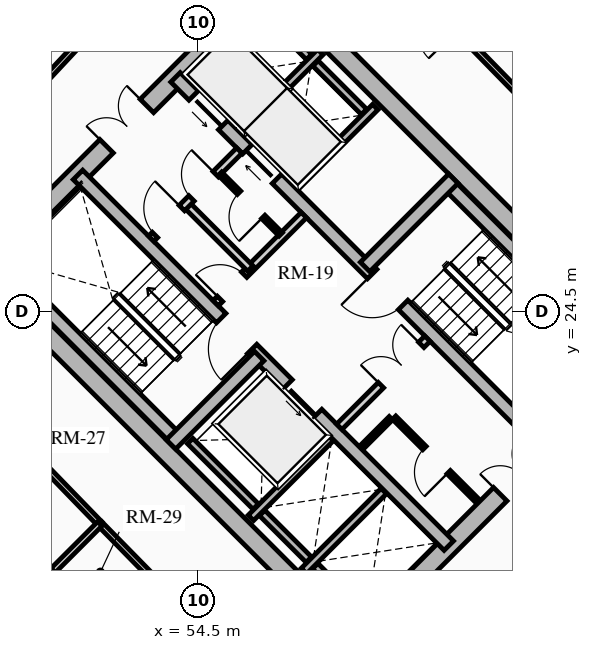
"""IFC4 building model, lengths in metres.
Left out: names, types, materials, properties, quantities, classifications, styles, units other than length and angle.
Written with IfcOpenShell. Run it as: python <this file> out.ifc"""

import sys

from ifc_helpers import new_model, si_unit, direction, frame, frame_2d, origin, place, context, subcontext, project, spatial, rectangle, extrude, source, transform, mapped, element, fill, save


model = new_model("IFC4")
c1 = context("Model", 3, precision=1e-05, world=origin(), true_north=direction((0.0, 1.0)))
c2 = subcontext(c1, "Body", "Model", "MODEL_VIEW")
j1 = project(units=[si_unit("LENGTHUNIT", "METRE"), si_unit("PLANEANGLEUNIT", "RADIAN")], contexts=[c1])
p1 = place(None, origin())
s1 = spatial("IfcSite", under=j1, at=p1, CompositionType="ELEMENT")
p2 = place(p1, origin())
s2 = spatial("IfcBuilding", under=s1, at=p2, CompositionType="ELEMENT")
p3 = place(p2, frame((0.0, 0.0, 27.82)))
s3 = spatial("IfcBuildingStorey", under=s2, at=p3, CompositionType="ELEMENT", Elevation=27.82)
for number, where, z_axis, x_axis in (
    (1, (58.773, 15.661, 0.0), (0.0, 0.0, 1.0), (-0.707, 0.707, 0.0)),
    (2, (66.339, 23.227, 0.0), (0.0, 0.0, 1.0), (-0.707, 0.707, 0.0)),
):
    element("IfcWall", number, at=place(p3, frame(where, z_axis=z_axis, x_axis=x_axis)), inside=s3, PredefinedType="SHEAR", context=c2, shape_type="SweptSolid", body=[
        extrude(rectangle(XDim=14.3, YDim=0.5, at=frame_2d((7.15, 0.0))), origin(), (0.0, 0.0, 1.0), 2.91),
    ])
p4 = place(p3, frame((58.596, 15.838, 0.0), z_axis=(0.0, 0.0, 1.0), x_axis=(0.707106781187, 0.707106781187, 0.0)))
e3 = element("IfcWall", 3, at=p4, inside=s3, PredefinedType="SHEAR", context=c2, shape_type="SweptSolid", body=[
    extrude(rectangle(XDim=10.7, YDim=0.5, at=frame_2d((5.35, 0.0))), origin(), (0.0, 0.0, 1.0), 2.91),
])
m1 = source(origin(), c2, "Body", "SweptSolid", [
    extrude(rectangle(XDim=1.5, YDim=2.02, at=frame_2d((0.75, 1.01))), frame((0.0, 0.26, 0.0), z_axis=(0.0, -1.0, 0.0), x_axis=(1.0, 0.0, 0.0)), (0.0, 0.0, 1.0), 0.52),
])
p5 = place(p4, frame((5.45, 0.0, 0.0)))
e4 = element("IfcOpeningElement", 4, at=p5, cuts=e3, PredefinedType="OPENING", context=c2, shape_type="MappedRepresentation", body=[
    mapped(m1, transform((0.0, 0.0, 0.0), x_axis=(1.0, 0.0, 0.0), y_axis=(0.0, 1.0, 0.0), z_axis=(0.0, 0.0, 1.0), scale=1.0)),
])
p6 = place(p3, frame((48.838, 25.596, 0.0), z_axis=(0.0, 0.0, 1.0), x_axis=(0.707106781187, 0.707106781187, 0.0)))
e5 = element("IfcWall", 5, at=p6, inside=s3, PredefinedType="SHEAR", context=c2, shape_type="SweptSolid", body=[
    extrude(rectangle(XDim=10.7, YDim=0.5, at=frame_2d((5.35, 0.0))), origin(), (0.0, 0.0, 1.0), 2.91),
])
p7 = place(p6, frame((4.6, 0.0, 0.0)))
e6 = element("IfcOpeningElement", 6, at=p7, cuts=e5, PredefinedType="OPENING", context=c2, shape_type="MappedRepresentation", body=[
    mapped(m1, transform((0.0, 0.0, 0.0), x_axis=(1.0, 0.0, 0.0), y_axis=(0.0, 1.0, 0.0), z_axis=(0.0, 0.0, 1.0), scale=1.0)),
])
p8 = place(p3, frame((61.096, 18.338, 0.0), z_axis=(0.0, 0.0, 1.0), x_axis=(-0.707106781187, 0.707106781187, 0.0)))
e7 = element("IfcWall", 7, at=p8, inside=s3, PredefinedType="SHEAR", context=c2, shape_type="SweptSolid", body=[
    extrude(rectangle(XDim=13.8, YDim=0.35, at=frame_2d((6.9, 0.0))), origin(), (0.0, 0.0, 1.0), 2.91),
])
m2 = source(origin(), c2, "Body", "SweptSolid", [
    extrude(rectangle(XDim=1.1, YDim=2.015, at=frame_2d((0.55, 1.007))), frame((0.0, 0.185, 0.0), z_axis=(0.0, -1.0, 0.0), x_axis=(1.0, 0.0, 0.0)), (0.0, 0.0, 1.0), 0.37),
])
p9 = place(p8, frame((4.9, 0.0, 0.0)))
e8 = element("IfcOpeningElement", 8, at=p9, cuts=e7, PredefinedType="OPENING", context=c2, shape_type="MappedRepresentation", body=[
    mapped(m2, transform((0.0, 0.0, 0.0), x_axis=(1.0, 0.0, 0.0), y_axis=(0.0, 1.0, 0.0), z_axis=(0.0, 0.0, 1.0), scale=1.0)),
])
m3 = source(origin(), c2, "Body", "SweptSolid", [
    extrude(rectangle(XDim=1.15, YDim=2.02, at=frame_2d((0.575, 1.01))), frame((0.0, 0.185, 0.0), z_axis=(0.0, -1.0, 0.0), x_axis=(1.0, 0.0, 0.0)), (0.0, 0.0, 1.0), 0.37),
])
p10 = place(p8, frame((7.32, 0.0, 0.0)))
e9 = element("IfcOpeningElement", 9, at=p10, cuts=e7, PredefinedType="OPENING", context=c2, shape_type="MappedRepresentation", body=[
    mapped(m3, transform((0.0, 0.0, 0.0), x_axis=(1.0, 0.0, 0.0), y_axis=(0.0, 1.0, 0.0), z_axis=(0.0, 0.0, 1.0), scale=1.0)),
])
p11 = place(p3, frame((63.662, 20.904, 0.0), z_axis=(0.0, 0.0, 1.0), x_axis=(-0.707106781187, 0.707106781187, 0.0)))
e10 = element("IfcWall", 10, at=p11, inside=s3, PredefinedType="SHEAR", context=c2, shape_type="SweptSolid", body=[
    extrude(rectangle(XDim=13.8, YDim=0.35, at=frame_2d((6.9, 0.0))), origin(), (0.0, 0.0, 1.0), 2.91),
])
p12 = place(p11, frame((10.025, 0.0, 0.0)))
e11 = element("IfcOpeningElement", 11, at=p12, cuts=e10, PredefinedType="OPENING", context=c2, shape_type="MappedRepresentation", body=[
    mapped(m2, transform((0.0, 0.0, 0.0), x_axis=(1.0, 0.0, 0.0), y_axis=(0.0, 1.0, 0.0), z_axis=(0.0, 0.0, 1.0), scale=1.0)),
])
p13 = place(p11, frame((12.025, 0.0, 0.0)))
e12 = element("IfcOpeningElement", 12, at=p13, cuts=e10, PredefinedType="OPENING", context=c2, shape_type="MappedRepresentation", body=[
    mapped(m2, transform((0.0, 0.0, 0.0), x_axis=(1.0, 0.0, 0.0), y_axis=(0.0, 1.0, 0.0), z_axis=(0.0, 0.0, 1.0), scale=1.0)),
])
p14 = place(p11, frame((5.33, 0.0, 0.0)))
e13 = element("IfcOpeningElement", 13, at=p14, cuts=e10, PredefinedType="OPENING", context=c2, shape_type="MappedRepresentation", body=[
    mapped(m3, transform((0.0, 0.0, 0.0), x_axis=(1.0, 0.0, 0.0), y_axis=(0.0, 1.0, 0.0), z_axis=(0.0, 0.0, 1.0), scale=1.0)),
])
p15 = place(p3, frame((53.922, 21.141, 0.0), z_axis=(0.0, 0.0, 1.0), x_axis=(-0.707106781187, 0.707106781187, 0.0)))
e14 = element("IfcWall", 14, at=p15, inside=s3, PredefinedType="SHEAR", context=c2, shape_type="SweptSolid", body=[
    extrude(rectangle(XDim=6.745, YDim=0.35, at=frame_2d((3.373, 0.0))), origin(), (0.0, 0.0, 1.0), 2.91),
])
p16 = place(p3, frame((53.784, 21.003, 0.0), z_axis=(0.0, 0.0, 1.0), x_axis=(0.707106781187, 0.707106781187, 0.0)))
e15 = element("IfcWall", 15, at=p16, inside=s3, PredefinedType="SHEAR", context=c2, shape_type="SweptSolid", body=[
    extrude(rectangle(XDim=3.285, YDim=0.35, at=frame_2d((1.643, 0.0))), origin(), (0.0, 0.0, 1.0), 2.91),
])
p17 = place(p3, frame((65.847, 23.089, 0.0), z_axis=(0.0, 0.0, 1.0), x_axis=(-0.707106781187, 0.707106781187, 0.0)))
e16 = element("IfcWall", 16, at=p17, inside=s3, PredefinedType="SHEAR", context=c2, shape_type="SweptSolid", body=[
    extrude(rectangle(XDim=6.745, YDim=0.35, at=frame_2d((3.373, 0.0))), origin(), (0.0, 0.0, 1.0), 2.91),
])
p18 = place(p3, frame((58.893, 25.674, 0.0), z_axis=(0.0, 0.0, 1.0), x_axis=(0.707106781187, 0.707106781187, 0.0)))
e17 = element("IfcWall", 17, at=p18, inside=s3, PredefinedType="SHEAR", context=c2, shape_type="SweptSolid", body=[
    extrude(rectangle(XDim=3.285, YDim=0.35, at=frame_2d((1.643, 0.0))), origin(), (0.0, 0.0, 1.0), 2.91),
])
p19 = place(p3, frame((55.888, 19.069, 0.0), z_axis=(0.0, 0.0, 1.0), x_axis=(0.707106781187, 0.707106781187, 0.0)))
e18 = element("IfcWall", 18, at=p19, inside=s3, PredefinedType="SHEAR", context=c2, shape_type="SweptSolid", body=[
    extrude(rectangle(XDim=2.97, YDim=0.2, at=frame_2d((1.485, 0.0))), origin(), (0.0, 0.0, 1.0), 2.91),
])
p20 = place(p3, frame((56.015, 19.366, 0.0), z_axis=(0.0, 0.0, 1.0), x_axis=(-0.707106781187, 0.707106781187, 0.0)))
e19 = element("IfcWall", 19, at=p20, inside=s3, PredefinedType="SHEAR", context=c2, shape_type="SweptSolid", body=[
    extrude(rectangle(XDim=2.44, YDim=0.2, at=frame_2d((1.22, 0.0))), origin(), (0.0, 0.0, 1.0), 2.91),
])
p21 = place(p3, frame((57.284, 17.673, 0.0), z_axis=(0.0, 0.0, 1.0), x_axis=(0.707147878904, 0.70706568108, 0.0)))
e20 = element("IfcWall", 20, at=p21, inside=s3, PredefinedType="SHEAR", context=c2, shape_type="SweptSolid", body=[
    extrude(rectangle(XDim=2.97, YDim=0.2, at=frame_2d((1.485, 0.0))), origin(), (0.0, 0.0, 1.0), 2.91),
])
p22 = place(p3, frame((57.412, 17.97, 0.0), z_axis=(0.0, 0.0, 1.0), x_axis=(-0.707106781187, 0.707106781187, 0.0)))
e21 = element("IfcWall", 21, at=p22, inside=s3, PredefinedType="SHEAR", context=c2, shape_type="SweptSolid", body=[
    extrude(rectangle(XDim=1.735, YDim=0.2, at=frame_2d((0.867, 0.0))), origin(), (0.0, 0.0, 1.0), 2.91),
])
p23 = place(p3, frame((58.737, 16.644, 0.0), z_axis=(0.0, 0.0, 1.0), x_axis=(-0.707032117043, 0.707181437447, 0.0)))
e22 = element("IfcWall", 22, at=p23, inside=s3, PredefinedType="SHEAR", context=c2, shape_type="SweptSolid", body=[
    extrude(rectangle(XDim=1.635, YDim=0.2, at=frame_2d((0.817, 0.0))), origin(), (0.0, 0.0, 1.0), 2.91),
])
p24 = place(p3, frame((57.062, 27.781, 0.0), z_axis=(0.0, 0.0, 1.0), x_axis=(0.707106781187, 0.707106781187, 0.0)))
e23 = element("IfcWall", 23, at=p24, inside=s3, PredefinedType="SHEAR", context=c2, shape_type="SweptSolid", body=[
    extrude(rectangle(XDim=2.97, YDim=0.2, at=frame_2d((1.485, 0.0))), origin(), (0.0, 0.0, 1.0), 2.91),
])
p25 = place(p3, frame((55.615, 29.227, 0.0), z_axis=(0.0, 0.0, 1.0), x_axis=(0.707147878904, 0.70706568108, 0.0)))
e24 = element("IfcWall", 24, at=p25, inside=s3, PredefinedType="SHEAR", context=c2, shape_type="SweptSolid", body=[
    extrude(rectangle(XDim=2.97, YDim=0.2, at=frame_2d((1.485, 0.0))), origin(), (0.0, 0.0, 1.0), 2.91),
])
p26 = place(p3, frame((58.865, 29.754, 0.0), z_axis=(0.0, 0.0, 1.0), x_axis=(-0.707174411312, 0.707039144592, 0.0)))
e25 = element("IfcWall", 25, at=p26, inside=s3, PredefinedType="SHEAR", context=c2, shape_type="SweptSolid", body=[
    extrude(rectangle(XDim=1.805, YDim=0.2, at=frame_2d((0.902, 0.0))), origin(), (0.0, 0.0, 1.0), 2.91),
])
p27 = place(p3, frame((57.419, 31.2, 0.0), z_axis=(0.0, 0.0, 1.0), x_axis=(-0.707032117043, 0.707181437447, 0.0)))
e26 = element("IfcWall", 26, at=p27, inside=s3, PredefinedType="SHEAR", context=c2, shape_type="SweptSolid", body=[
    extrude(rectangle(XDim=1.635, YDim=0.2, at=frame_2d((0.817, 0.0))), origin(), (0.0, 0.0, 1.0), 2.91),
])
p28 = place(p3, frame((58.214, 21.467, 0.0), z_axis=(0.0, 0.0, 1.0), x_axis=(0.707106781187, 0.707106781187, 0.0)))
e27 = element("IfcWall", 27, at=p28, inside=s3, PredefinedType="PARTITIONING", context=c2, shape_type="SweptSolid", body=[
    extrude(rectangle(XDim=3.28, YDim=0.2, at=frame_2d((1.64, 0.0))), origin(), (0.0, 0.0, 1.0), 2.635),
])
m4 = source(origin(), c2, "Body", "SweptSolid", [
    extrude(rectangle(XDim=1.5, YDim=2.02, at=frame_2d((0.75, 1.01))), frame((0.0, 0.11, 0.0), z_axis=(0.0, -1.0, 0.0), x_axis=(1.0, 0.0, 0.0)), (0.0, 0.0, 1.0), 0.22),
])
p29 = place(p28, frame((1.55, 0.0, 0.0)))
e28 = element("IfcOpeningElement", 28, at=p29, cuts=e27, PredefinedType="OPENING", context=c2, shape_type="MappedRepresentation", body=[
    mapped(m4, transform((0.0, 0.0, 0.0), x_axis=(1.0, 0.0, 0.0), y_axis=(0.0, 1.0, 0.0), z_axis=(0.0, 0.0, 1.0), scale=1.0)),
])
p30 = place(p3, frame((54.961, 24.719, 0.0), z_axis=(0.0, 0.0, 1.0), x_axis=(0.707106781187, 0.707106781187, 0.0)))
e29 = element("IfcWall", 29, at=p30, inside=s3, PredefinedType="PARTITIONING", context=c2, shape_type="SweptSolid", body=[
    extrude(rectangle(XDim=3.28, YDim=0.2, at=frame_2d((1.64, 0.0))), origin(), (0.0, 0.0, 1.0), 2.635),
])
m5 = source(origin(), c2, "Body", "SweptSolid", [
    extrude(rectangle(XDim=0.9, YDim=2.005, at=frame_2d((0.45, 1.002))), frame((0.0, 0.11, 0.0), z_axis=(0.0, -1.0, 0.0), x_axis=(1.0, 0.0, 0.0)), (0.0, 0.0, 1.0), 0.22),
])
p31 = place(p30, frame((0.16, 0.0, 0.0)))
e30 = element("IfcOpeningElement", 30, at=p31, cuts=e29, PredefinedType="OPENING", context=c2, shape_type="MappedRepresentation", body=[
    mapped(m5, transform((0.0, 0.0, 0.0), x_axis=(1.0, 0.0, 0.0), y_axis=(0.0, 1.0, 0.0), z_axis=(0.0, 0.0, 1.0), scale=1.0)),
])
p32 = place(p3, frame((55.874, 25.631, 0.0), z_axis=(0.0, 0.0, 1.0), x_axis=(-0.707157639372, 0.707055919343, 0.0)))
e31 = element("IfcWall", 31, at=p32, inside=s3, PredefinedType="PARTITIONING", context=c2, shape_type="SweptSolid", body=[
    extrude(rectangle(XDim=2.4, YDim=0.2, at=frame_2d((1.2, 0.0))), origin(), (0.0, 0.0, 1.0), 2.635),
])
p33 = place(p3, frame((53.264, 26.416, 0.0), z_axis=(0.0, 0.0, 1.0), x_axis=(0.707106781187, 0.707106781187, 0.0)))
e32 = element("IfcWall", 32, at=p33, inside=s3, PredefinedType="PARTITIONING", context=c2, shape_type="SweptSolid", body=[
    extrude(rectangle(XDim=3.28, YDim=0.2, at=frame_2d((1.64, 0.0))), origin(), (0.0, 0.0, 1.0), 2.635),
])
m6 = source(origin(), c2, "Body", "SweptSolid", [
    extrude(rectangle(XDim=1.0, YDim=2.015, at=frame_2d((0.5, 1.007))), frame((0.0, 0.11, 0.0), z_axis=(0.0, -1.0, 0.0), x_axis=(1.0, 0.0, 0.0)), (0.0, 0.0, 1.0), 0.22),
])
p34 = place(p33, frame((0.14, 0.0, 0.0)))
e33 = element("IfcOpeningElement", 33, at=p34, cuts=e32, PredefinedType="OPENING", context=c2, shape_type="MappedRepresentation", body=[
    mapped(m6, transform((0.0, 0.0, 0.0), x_axis=(1.0, 0.0, 0.0), y_axis=(0.0, 1.0, 0.0), z_axis=(0.0, 0.0, 1.0), scale=1.0)),
])
p35 = place(p33, frame((1.5, 0.0, 0.0)))
e34 = element("IfcOpeningElement", 34, at=p35, cuts=e32, PredefinedType="OPENING", context=c2, shape_type="MappedRepresentation", body=[
    mapped(m5, transform((0.0, 0.0, 0.0), x_axis=(1.0, 0.0, 0.0), y_axis=(0.0, 1.0, 0.0), z_axis=(0.0, 0.0, 1.0), scale=1.0)),
])
p36 = place(p3, frame((61.835, 19.529, 0.0), z_axis=(0.0, 0.0, 1.0), x_axis=(-0.707146413884, 0.707067146267, 0.0)))
e35 = element("IfcWall", 35, at=p36, inside=s3, PredefinedType="PARTITIONING", context=c2, shape_type="SweptSolid", body=[
    extrude(rectangle(XDim=3.08, YDim=0.125, at=frame_2d((1.54, 0.0))), origin(), (0.0, 0.0, 1.0), 2.635),
])
m7 = source(origin(), c2, "Body", "SweptSolid", [
    extrude(rectangle(XDim=0.9, YDim=2.005, at=frame_2d((0.45, 1.002))), frame((0.0, 0.073, 0.0), z_axis=(0.0, -1.0, 0.0), x_axis=(1.0, 0.0, 0.0)), (0.0, 0.0, 1.0), 0.145),
])
p37 = place(p36, frame((1.05, 0.0, 0.0)))
e36 = element("IfcOpeningElement", 36, at=p37, cuts=e35, PredefinedType="OPENING", context=c2, shape_type="MappedRepresentation", body=[
    mapped(m7, transform((0.0, 0.0, 0.0), x_axis=(1.0, 0.0, 0.0), y_axis=(0.0, 1.0, 0.0), z_axis=(0.0, 0.0, 1.0), scale=1.0)),
])
p38 = place(p3, frame((58.794, 20.915, 0.0), z_axis=(0.0, 0.0, 1.0), x_axis=(0.707106781187, 0.707106781187, 0.0)))
e37 = element("IfcWall", 37, at=p38, inside=s3, PredefinedType="PARTITIONING", context=c2, shape_type="SweptSolid", body=[
    extrude(rectangle(XDim=1.1, YDim=0.125, at=frame_2d((0.55, 0.0))), origin(), (0.0, 0.0, 1.0), 2.635),
])
p39 = place(p3, frame((56.673, 26.529, 0.0), z_axis=(0.0, 0.0, 1.0), x_axis=(-0.707052764397, 0.70716079385, 0.0)))
e38 = element("IfcWall", 38, at=p39, inside=s3, PredefinedType="PARTITIONING", context=c2, shape_type="SweptSolid", body=[
    extrude(rectangle(XDim=2.26, YDim=0.125, at=frame_2d((1.13, 0.0))), origin(), (0.0, 0.0, 1.0), 2.635),
])
p40 = place(p39, frame((0.65, 0.0, 0.0)))
e39 = element("IfcOpeningElement", 39, at=p40, cuts=e38, PredefinedType="OPENING", context=c2, shape_type="MappedRepresentation", body=[
    mapped(m7, transform((0.0, 0.0, 0.0), x_axis=(1.0, 0.0, 0.0), y_axis=(0.0, 1.0, 0.0), z_axis=(0.0, 0.0, 1.0), scale=1.0)),
])
p41 = place(p3, frame((63.086, 30.086, 0.0), z_axis=(0.0, 0.0, 1.0), x_axis=(-0.699075897379, 0.715047473741, 0.0)))
e40 = element("IfcWall", 40, at=p41, inside=s3, PredefinedType="PARTITIONING", context=c2, shape_type="SweptSolid", body=[
    extrude(rectangle(XDim=6.114, YDim=0.15, at=frame_2d((3.057, 0.0))), origin(), (0.0, 0.0, 1.0), 2.159),
])
m8 = source(origin(), c2, "Body", "SweptSolid", [
    extrude(rectangle(XDim=1.05, YDim=2.015, at=frame_2d((0.525, 1.007))), frame((0.0, 0.085, 0.0), z_axis=(0.0, -1.0, 0.0), x_axis=(1.0, 0.0, 0.0)), (0.0, 0.0, 1.0), 0.17),
])
p42 = place(p41, frame((2.532, 0.0, 0.0)))
e41 = element("IfcOpeningElement", 41, at=p42, cuts=e40, PredefinedType="OPENING", context=c2, shape_type="MappedRepresentation", body=[
    mapped(m8, transform((0.0, 0.0, 0.0), x_axis=(1.0, 0.0, 0.0), y_axis=(0.0, 1.0, 0.0), z_axis=(0.0, 0.0, 1.0), scale=1.0)),
])
p43 = place(p3, frame((52.043, 32.28, 0.0), z_axis=(0.0, 0.0, 1.0), x_axis=(-0.682606081633, -0.730786519661, 0.0)))
e42 = element("IfcWall", 42, at=p43, inside=s3, PredefinedType="PARTITIONING", context=c2, shape_type="SweptSolid", body=[
    extrude(rectangle(XDim=6.527, YDim=0.15, at=frame_2d((3.263, 0.0))), origin(), (0.0, 0.0, 1.0), 2.159),
])
p44 = place(p3, frame((47.706, 23.253, 0.0), z_axis=(0.0, 0.0, 1.0), x_axis=(0.696179266346, -0.717867974707, 0.0)))
e43 = element("IfcWall", 43, at=p44, inside=s3, PredefinedType="PARTITIONING", context=c2, shape_type="SweptSolid", body=[
    extrude(rectangle(XDim=6.045, YDim=0.15, at=frame_2d((3.022, 0.0))), origin(), (0.0, 0.0, 1.0), 2.635),
])
p45 = place(p3, frame((51.914, 18.914, 0.0), z_axis=(0.0, 0.0, 1.0), x_axis=(0.699999313799, -0.714143515465, 0.0)))
e44 = element("IfcWall", 44, at=p45, inside=s3, PredefinedType="PARTITIONING", context=c2, shape_type="SweptSolid", body=[
    extrude(rectangle(XDim=6.162, YDim=0.15, at=frame_2d((3.081, 0.0))), origin(), (0.0, 0.0, 1.0), 2.159),
])
p46 = place(p3, frame((51.914, 18.914, 0.0), z_axis=(0.0, 0.0, 1.0), x_axis=(-0.707106781187, -0.707106781187, 0.0)))
e45 = element("IfcWall", 45, at=p46, inside=s3, PredefinedType="PARTITIONING", context=c2, shape_type="SweptSolid", body=[
    extrude(rectangle(XDim=6.431, YDim=0.16, at=frame_2d((3.215, 0.0))), origin(), (0.0, 0.0, 1.0), 2.073),
])
p47 = place(p3, frame((46.676, 21.978, 0.0), z_axis=(0.0, 0.0, 1.0), x_axis=(0.67473816271, -0.738057187339, 0.0)))
e46 = element("IfcWall", 46, at=p47, inside=s3, PredefinedType="PARTITIONING", context=c2, shape_type="SweptSolid", body=[
    extrude(rectangle(XDim=5.876, YDim=0.125, at=frame_2d((2.938, 0.0))), origin(), (0.0, 0.0, 1.0), 2.635),
])
m9 = source(origin(), c2, "Body", "SweptSolid", [
    extrude(rectangle(XDim=1.1, YDim=2.015, at=frame_2d((0.55, 1.007))), frame((0.0, 0.025, 0.0), z_axis=(0.0, -1.0, 0.0), x_axis=(1.0, 0.0, 0.0)), (0.0, 0.0, 1.0), 0.05),
])
p48 = place(p9, origin())
e47 = element("IfcDoor", 47, at=p48, inside=s3, OperationType="SLIDING_TO_LEFT", PredefinedType="DOOR", context=c2, shape_type="MappedRepresentation", body=[
    mapped(m9, transform((0.0, 0.0, 0.0), x_axis=(1.0, 0.0, 0.0), y_axis=(0.0, 1.0, 0.0), z_axis=(0.0, 0.0, 1.0), scale=1.0)),
])
fill(e8, e47)
p49 = place(p12, origin())
e48 = element("IfcDoor", 48, at=p49, inside=s3, OperationType="SLIDING_TO_RIGHT", PredefinedType="DOOR", context=c2, shape_type="MappedRepresentation", body=[
    mapped(m9, transform((0.0, 0.0, 0.0), x_axis=(1.0, 0.0, 0.0), y_axis=(0.0, 1.0, 0.0), z_axis=(0.0, 0.0, 1.0), scale=1.0)),
])
fill(e11, e48)
p50 = place(p13, origin())
e49 = element("IfcDoor", 49, at=p50, inside=s3, OperationType="SLIDING_TO_LEFT", PredefinedType="DOOR", context=c2, shape_type="MappedRepresentation", body=[
    mapped(m9, transform((0.0, 0.0, 0.0), x_axis=(1.0, 0.0, 0.0), y_axis=(0.0, 1.0, 0.0), z_axis=(0.0, 0.0, 1.0), scale=1.0)),
])
fill(e12, e49)
m10 = source(origin(), c2, "Body", "SweptSolid", [
    extrude(rectangle(XDim=1.15, YDim=2.02, at=frame_2d((0.575, 1.01))), frame((0.0, 0.025, 0.0), z_axis=(0.0, -1.0, 0.0), x_axis=(1.0, 0.0, 0.0)), (0.0, 0.0, 1.0), 0.05),
])
p51 = place(p10, origin())
e50 = element("IfcDoor", 50, at=p51, inside=s3, OperationType="SINGLE_SWING_LEFT", PredefinedType="DOOR", context=c2, shape_type="MappedRepresentation", body=[
    mapped(m10, transform((0.0, 0.0, 0.0), x_axis=(1.0, 0.0, 0.0), y_axis=(0.0, 1.0, 0.0), z_axis=(0.0, 0.0, 1.0), scale=1.0)),
])
fill(e9, e50)
p52 = place(p14, origin())
e51 = element("IfcDoor", 51, at=p52, inside=s3, OperationType="SINGLE_SWING_RIGHT", PredefinedType="DOOR", context=c2, shape_type="MappedRepresentation", body=[
    mapped(m10, transform((0.0, 0.0, 0.0), x_axis=(1.0, 0.0, 0.0), y_axis=(0.0, 1.0, 0.0), z_axis=(0.0, 0.0, 1.0), scale=1.0)),
])
fill(e13, e51)
m11 = source(origin(), c2, "Body", "SweptSolid", [
    extrude(rectangle(XDim=1.5, YDim=2.02, at=frame_2d((0.75, 1.01))), frame((0.0, 0.025, 0.0), z_axis=(0.0, -1.0, 0.0), x_axis=(1.0, 0.0, 0.0)), (0.0, 0.0, 1.0), 0.05),
])
p53 = place(p7, origin())
e52 = element("IfcDoor", 52, at=p53, inside=s3, OperationType="DOUBLE_DOOR_SINGLE_SWING", PredefinedType="DOOR", context=c2, shape_type="MappedRepresentation", body=[
    mapped(m11, transform((0.0, 0.0, 0.0), x_axis=(1.0, 0.0, 0.0), y_axis=(0.0, 1.0, 0.0), z_axis=(0.0, 0.0, 1.0), scale=1.0)),
])
fill(e6, e52)
p54 = place(p5, origin())
e53 = element("IfcDoor", 53, at=p54, inside=s3, OperationType="DOUBLE_DOOR_SINGLE_SWING", PredefinedType="DOOR", context=c2, shape_type="MappedRepresentation", body=[
    mapped(m11, transform((0.0, 0.0, 0.0), x_axis=(1.0, 0.0, 0.0), y_axis=(0.0, 1.0, 0.0), z_axis=(0.0, 0.0, 1.0), scale=1.0)),
])
fill(e4, e53)
p55 = place(p29, origin())
e54 = element("IfcDoor", 54, at=p55, inside=s3, OperationType="DOUBLE_DOOR_SINGLE_SWING", PredefinedType="DOOR", context=c2, shape_type="MappedRepresentation", body=[
    mapped(m11, transform((0.0, 0.0, 0.0), x_axis=(1.0, 0.0, 0.0), y_axis=(0.0, 1.0, 0.0), z_axis=(0.0, 0.0, 1.0), scale=1.0)),
])
fill(e28, e54)
m12 = source(origin(), c2, "Body", "SweptSolid", [
    extrude(rectangle(XDim=0.9, YDim=2.005, at=frame_2d((0.45, 1.002))), frame((0.0, 0.025, 0.0), z_axis=(0.0, -1.0, 0.0), x_axis=(1.0, 0.0, 0.0)), (0.0, 0.0, 1.0), 0.05),
])
p56 = place(p31, origin())
e55 = element("IfcDoor", 55, at=p56, inside=s3, OperationType="SINGLE_SWING_LEFT", PredefinedType="DOOR", context=c2, shape_type="MappedRepresentation", body=[
    mapped(m12, transform((0.0, 0.0, 0.0), x_axis=(1.0, 0.0, 0.0), y_axis=(0.0, 1.0, 0.0), z_axis=(0.0, 0.0, 1.0), scale=1.0)),
])
fill(e30, e55)
m13 = source(origin(), c2, "Body", "SweptSolid", [
    extrude(rectangle(XDim=1.0, YDim=2.015, at=frame_2d((0.5, 1.007))), frame((0.0, 0.025, 0.0), z_axis=(0.0, -1.0, 0.0), x_axis=(1.0, 0.0, 0.0)), (0.0, 0.0, 1.0), 0.05),
])
p57 = place(p34, origin())
e56 = element("IfcDoor", 56, at=p57, inside=s3, OperationType="SINGLE_SWING_RIGHT", PredefinedType="DOOR", context=c2, shape_type="MappedRepresentation", body=[
    mapped(m13, transform((0.0, 0.0, 0.0), x_axis=(1.0, 0.0, 0.0), y_axis=(0.0, 1.0, 0.0), z_axis=(0.0, 0.0, 1.0), scale=1.0)),
])
fill(e33, e56)
p58 = place(p37, origin())
e57 = element("IfcDoor", 57, at=p58, inside=s3, OperationType="SINGLE_SWING_LEFT", PredefinedType="DOOR", context=c2, shape_type="MappedRepresentation", body=[
    mapped(m12, transform((0.0, 0.0, 0.0), x_axis=(1.0, 0.0, 0.0), y_axis=(0.0, 1.0, 0.0), z_axis=(0.0, 0.0, 1.0), scale=1.0)),
])
fill(e36, e57)
p59 = place(p35, origin())
e58 = element("IfcDoor", 58, at=p59, inside=s3, OperationType="SINGLE_SWING_RIGHT", PredefinedType="DOOR", context=c2, shape_type="MappedRepresentation", body=[
    mapped(m12, transform((0.0, 0.0, 0.0), x_axis=(1.0, 0.0, 0.0), y_axis=(0.0, 1.0, 0.0), z_axis=(0.0, 0.0, 1.0), scale=1.0)),
])
fill(e34, e58)
p60 = place(p40, origin())
e59 = element("IfcDoor", 59, at=p60, inside=s3, OperationType="SINGLE_SWING_LEFT", PredefinedType="DOOR", context=c2, shape_type="MappedRepresentation", body=[
    mapped(m12, transform((0.0, 0.0, 0.0), x_axis=(1.0, 0.0, 0.0), y_axis=(0.0, 1.0, 0.0), z_axis=(0.0, 0.0, 1.0), scale=1.0)),
])
fill(e39, e59)
save(model, sys.argv[1])
